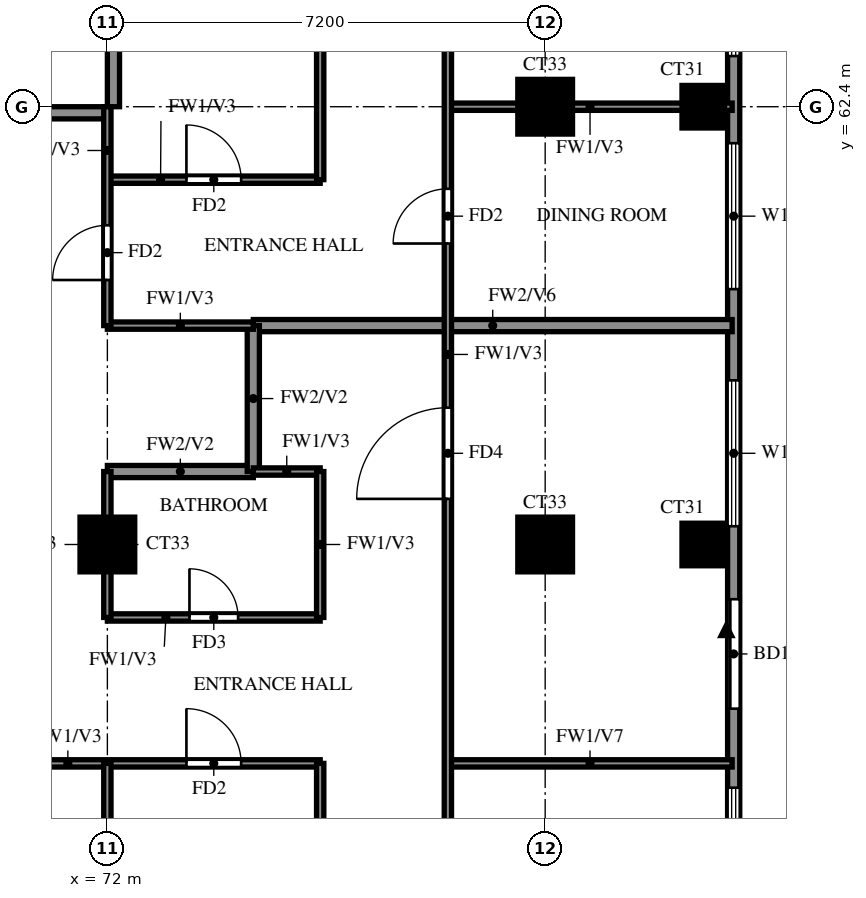
"""IFC4 building model, lengths in metres.
Left out: names, types, materials, properties, quantities, classifications, styles, units other than length and angle.
Written with IfcOpenShell. Run it as: python <this file> out.ifc"""

import sys

from ifc_helpers import new_model, si_unit, direction, frame, frame_2d, origin, origin_2d, place, context, subcontext, project, spatial, rectangle, extrude, source, transform, mapped, element, fill, save


model = new_model("IFC4")
c1 = context("Model", 3, precision=1e-05, world=origin(), true_north=direction((0.0, 1.0)))
c2 = subcontext(c1, "Body", "Model", "MODEL_VIEW")
j1 = project(units=[si_unit("LENGTHUNIT", "METRE"), si_unit("PLANEANGLEUNIT", "RADIAN")], contexts=[c1])
p1 = place(None, origin())
s1 = spatial("IfcSite", under=j1, at=p1, CompositionType="ELEMENT")
p2 = place(p1, origin())
s2 = spatial("IfcBuilding", under=s1, at=p2, CompositionType="ELEMENT")
p3 = place(p2, frame((0.0, 0.0, 211.5)))
s3 = spatial("IfcBuildingStorey", under=s2, at=p3, CompositionType="ELEMENT", Elevation=211.5)
m1 = source(origin(), c2, "Body", "SweptSolid", [
    extrude(rectangle(XDim=0.9, YDim=0.9, at=origin_2d()), origin(), (0.0, 0.0, 1.0), 3.22),
])
for number, where, z_axis, x_axis in (
    (1, (72.0, 55.2, 0.0), (0.0, 0.0, 1.0), (1.0, 0.0, 0.0)),
    (2, (79.2, 55.2, 0.0), (0.0, 0.0, 1.0), (1.0, 0.0, 0.0)),
):
    element("IfcColumn", number, at=place(p3, frame(where, z_axis=z_axis, x_axis=x_axis)), inside=s3, PredefinedType="COLUMN", context=c2, shape_type="MappedRepresentation", body=[
        mapped(m1, transform((0.0, 0.0, 0.0))),
    ])
m2 = source(origin(), c2, "Body", "SweptSolid", [
    extrude(rectangle(XDim=0.7, YDim=0.7, at=origin_2d()), origin(), (0.0, 0.0, 1.0), 3.5),
])
p4 = place(p3, frame((81.8, 55.2, -0.28), z_axis=(0.0, 0.0, 1.0), x_axis=(1.0, 0.0, 0.0)))
e3 = element("IfcColumn", 3, at=p4, inside=s3, PredefinedType="COLUMN", context=c2, shape_type="MappedRepresentation", body=[
    mapped(m2, transform((0.0, 0.0, 0.0))),
])
p5 = place(p3, frame((79.2, 62.4, 0.0), z_axis=(0.0, 0.0, 1.0), x_axis=(1.0, 0.0, 0.0)))
e4 = element("IfcColumn", 4, at=p5, inside=s3, PredefinedType="COLUMN", context=c2, shape_type="MappedRepresentation", body=[
    mapped(m1, transform((0.0, 0.0, 0.0))),
])
p6 = place(p3, frame((81.8, 62.4, -0.28), z_axis=(0.0, 0.0, 1.0), x_axis=(1.0, 0.0, 0.0)))
e5 = element("IfcColumn", 5, at=p6, inside=s3, PredefinedType="COLUMN", context=c2, shape_type="MappedRepresentation", body=[
    mapped(m2, transform((0.0, 0.0, 0.0))),
])
p7 = place(p3, frame((82.3, 48.2, 0.0), z_axis=(0.0, 0.0, 1.0), x_axis=(0.0, 1.0, 0.0)))
e6 = element("IfcWall", 6, at=p7, inside=s3, PredefinedType="SOLIDWALL", context=c2, shape_type="SweptSolid", body=[
    extrude(rectangle(XDim=28.6, YDim=0.2, at=frame_2d((14.3, 0.0))), origin(), (0.0, 0.0, 1.0), 3.22),
])
p8 = place(p7, frame((4.3, 0.0, 0.0)))
e7 = element("IfcOpeningElement", 7, at=p8, cuts=e6, PredefinedType="OPENING", context=c2, shape_type="SweptSolid", body=[
    extrude(rectangle(XDim=1.8, YDim=2.4, at=frame_2d((0.9, 1.2))), frame((0.0, 0.11, 0.0), z_axis=(0.0, -1.0, 0.0), x_axis=(1.0, 0.0, 0.0)), (0.0, 0.0, 1.0), 0.22),
])
p9 = place(p7, frame((0.6, 0.0, 0.6)))
e8 = element("IfcOpeningElement", 8, at=p9, cuts=e6, PredefinedType="OPENING", context=c2, shape_type="SweptSolid", body=[
    extrude(rectangle(XDim=2.4, YDim=2.4, at=frame_2d((1.2, 1.2))), frame((0.0, 0.11, 0.0), z_axis=(0.0, -1.0, 0.0), x_axis=(1.0, 0.0, 0.0)), (0.0, 0.0, 1.0), 0.22),
])
p10 = place(p7, frame((7.3, 0.0, 0.6)))
e9 = element("IfcOpeningElement", 9, at=p10, cuts=e6, PredefinedType="OPENING", context=c2, shape_type="SweptSolid", body=[
    extrude(rectangle(XDim=2.4, YDim=2.4, at=frame_2d((1.2, 1.2))), frame((0.0, 0.11, 0.0), z_axis=(0.0, -1.0, 0.0), x_axis=(1.0, 0.0, 0.0)), (0.0, 0.0, 1.0), 0.22),
])
p11 = place(p7, frame((11.2, 0.0, 0.6)))
e10 = element("IfcOpeningElement", 10, at=p11, cuts=e6, PredefinedType="OPENING", context=c2, shape_type="SweptSolid", body=[
    extrude(rectangle(XDim=2.4, YDim=2.4, at=frame_2d((1.2, 1.2))), frame((0.0, 0.11, 0.0), z_axis=(0.0, -1.0, 0.0), x_axis=(1.0, 0.0, 0.0)), (0.0, 0.0, 1.0), 0.22),
])
p12 = place(p7, frame((15.033, 0.0, 0.6)))
e11 = element("IfcOpeningElement", 11, at=p12, cuts=e6, PredefinedType="OPENING", context=c2, shape_type="SweptSolid", body=[
    extrude(rectangle(XDim=2.4, YDim=2.4, at=frame_2d((1.2, 1.2))), frame((0.0, 0.11, 0.0), z_axis=(0.0, -1.0, 0.0), x_axis=(1.0, 0.0, 0.0)), (0.0, 0.0, 1.0), 0.22),
])
p13 = place(p7, frame((18.167, 0.0, 0.6)))
e12 = element("IfcOpeningElement", 12, at=p13, cuts=e6, PredefinedType="OPENING", context=c2, shape_type="SweptSolid", body=[
    extrude(rectangle(XDim=2.4, YDim=2.4, at=frame_2d((1.2, 1.2))), frame((0.0, 0.11, 0.0), z_axis=(0.0, -1.0, 0.0), x_axis=(1.0, 0.0, 0.0)), (0.0, 0.0, 1.0), 0.22),
])
p14 = place(p7, frame((22.75, 0.0, 1.5)))
e13 = element("IfcOpeningElement", 13, at=p14, cuts=e6, PredefinedType="OPENING", context=c2, shape_type="SweptSolid", body=[
    extrude(rectangle(XDim=0.9, YDim=0.9, at=frame_2d((0.45, 0.45))), frame((0.0, 0.11, 0.0), z_axis=(0.0, -1.0, 0.0), x_axis=(1.0, 0.0, 0.0)), (0.0, 0.0, 1.0), 0.22),
])
p15 = place(p7, frame((25.5, 0.0, 0.6)))
e14 = element("IfcOpeningElement", 14, at=p15, cuts=e6, PredefinedType="OPENING", context=c2, shape_type="SweptSolid", body=[
    extrude(rectangle(XDim=2.4, YDim=2.4, at=frame_2d((1.2, 1.2))), frame((0.0, 0.11, 0.0), z_axis=(0.0, -1.0, 0.0), x_axis=(1.0, 0.0, 0.0)), (0.0, 0.0, 1.0), 0.22),
])
p16 = place(p3, frame((67.2, 62.3, 0.0), z_axis=(0.0, 0.0, 1.0), x_axis=(1.0, 0.0, 0.0)))
e15 = element("IfcWall", 15, at=p16, inside=s3, PredefinedType="SOLIDWALL", context=c2, shape_type="SweptSolid", body=[
    extrude(rectangle(XDim=4.8, YDim=0.2, at=frame_2d((2.4, 0.0))), origin(), (0.0, 0.0, 1.0), 3.22),
])
p17 = place(p3, frame((72.1, 62.4, 0.0), z_axis=(0.0, 0.0, 1.0), x_axis=(0.0, 1.0, 0.0)))
e16 = element("IfcWall", 16, at=p17, inside=s3, PredefinedType="SOLIDWALL", context=c2, shape_type="SweptSolid", body=[
    extrude(rectangle(XDim=15.6, YDim=0.2, at=frame_2d((7.8, 0.0))), origin(), (0.0, 0.0, 1.0), 3.22),
])
p18 = place(p3, frame((72.0, 56.4, 0.0), z_axis=(0.0, 0.0, 1.0), x_axis=(1.0, 0.0, 0.0)))
e17 = element("IfcWall", 17, at=p18, inside=s3, PredefinedType="SOLIDWALL", context=c2, shape_type="SweptSolid", body=[
    extrude(rectangle(XDim=2.4, YDim=0.2, at=frame_2d((1.2, 0.0))), origin(), (0.0, 0.0, 1.0), 3.22),
])
p19 = place(p3, frame((74.4, 58.8, 0.0), z_axis=(0.0, 0.0, 1.0), x_axis=(1.0, 0.0, 0.0)))
e18 = element("IfcWall", 18, at=p19, inside=s3, PredefinedType="SOLIDWALL", context=c2, shape_type="SweptSolid", body=[
    extrude(rectangle(XDim=7.875, YDim=0.2, at=frame_2d((3.938, 0.0))), origin(), (0.0, 0.0, 1.0), 2.32),
])
p20 = place(p3, frame((74.4, 56.4, 0.0), z_axis=(0.0, 0.0, 1.0), x_axis=(0.0, 1.0, 0.0)))
e19 = element("IfcWall", 19, at=p20, inside=s3, PredefinedType="SOLIDWALL", context=c2, shape_type="SweptSolid", body=[
    extrude(rectangle(XDim=2.4, YDim=0.2, at=frame_2d((1.2, 0.0))), origin(), (0.0, 0.0, 1.0), 3.22),
])
p21 = place(p3, frame((67.2, 51.6, 0.0), z_axis=(0.0, 0.0, 1.0), x_axis=(1.0, 0.0, 0.0)))
e20 = element("IfcWall", 20, at=p21, inside=s3, PredefinedType="PARTITIONING", context=c2, shape_type="SweptSolid", body=[
    extrude(rectangle(XDim=8.3, YDim=0.12, at=frame_2d((4.15, 0.0))), origin(), (0.0, 0.0, 1.0), 3.22),
])
p22 = place(p21, frame((6.1, 0.0, 0.0)))
e21 = element("IfcOpeningElement", 21, at=p22, cuts=e20, PredefinedType="OPENING", context=c2, shape_type="SweptSolid", body=[
    extrude(rectangle(XDim=0.9, YDim=2.1, at=frame_2d((0.45, 1.05))), frame((0.0, 0.07, 0.0), z_axis=(0.0, -1.0, 0.0), x_axis=(1.0, 0.0, 0.0)), (0.0, 0.0, 1.0), 0.14),
])
p23 = place(p21, frame((1.95, 0.0, 0.0)))
e22 = element("IfcOpeningElement", 22, at=p23, cuts=e20, PredefinedType="OPENING", context=c2, shape_type="SweptSolid", body=[
    extrude(rectangle(XDim=0.9, YDim=2.1, at=frame_2d((0.45, 1.05))), frame((0.0, 0.07, 0.0), z_axis=(0.0, -1.0, 0.0), x_axis=(1.0, 0.0, 0.0)), (0.0, 0.0, 1.0), 0.14),
])
p24 = place(p3, frame((77.6, 51.6, 0.0), z_axis=(0.0, 0.0, 1.0), x_axis=(1.0, 0.0, 0.0)))
e23 = element("IfcWall", 23, at=p24, inside=s3, PredefinedType="PARTITIONING", context=c2, shape_type="SweptSolid", body=[
    extrude(rectangle(XDim=4.675, YDim=0.12, at=frame_2d((2.337, 0.0))), origin(), (0.0, 0.0, 1.0), 2.32),
])
p25 = place(p3, frame((72.0, 54.0, 0.0), z_axis=(0.0, 0.0, 1.0), x_axis=(1.0, 0.0, 0.0)))
e24 = element("IfcWall", 24, at=p25, inside=s3, PredefinedType="PARTITIONING", context=c2, shape_type="SweptSolid", body=[
    extrude(rectangle(XDim=3.5, YDim=0.12, at=frame_2d((1.75, 0.0))), origin(), (0.0, 0.0, 1.0), 3.22),
])
p26 = place(p25, frame((1.35, 0.0, 0.0)))
e25 = element("IfcOpeningElement", 25, at=p26, cuts=e24, PredefinedType="OPENING", context=c2, shape_type="SweptSolid", body=[
    extrude(rectangle(XDim=0.8, YDim=2.1, at=frame_2d((0.4, 1.05))), frame((0.0, 0.07, 0.0), z_axis=(0.0, -1.0, 0.0), x_axis=(1.0, 0.0, 0.0)), (0.0, 0.0, 1.0), 0.14),
])
p27 = place(p3, frame((74.4, 56.4, 0.0), z_axis=(0.0, 0.0, 1.0), x_axis=(1.0, 0.0, 0.0)))
e26 = element("IfcWall", 26, at=p27, inside=s3, PredefinedType="PARTITIONING", context=c2, shape_type="SweptSolid", body=[
    extrude(rectangle(XDim=1.1, YDim=0.12, at=frame_2d((0.55, 0.0))), origin(), (0.0, 0.0, 1.0), 3.22),
])
p28 = place(p3, frame((72.0, 58.8, 0.0), z_axis=(0.0, 0.0, 1.0), x_axis=(1.0, 0.0, 0.0)))
e27 = element("IfcWall", 27, at=p28, inside=s3, PredefinedType="PARTITIONING", context=c2, shape_type="SweptSolid", body=[
    extrude(rectangle(XDim=2.4, YDim=0.12, at=frame_2d((1.2, 0.0))), origin(), (0.0, 0.0, 1.0), 3.22),
])
p29 = place(p3, frame((72.0, 61.2, 0.0), z_axis=(0.0, 0.0, 1.0), x_axis=(1.0, 0.0, 0.0)))
e28 = element("IfcWall", 28, at=p29, inside=s3, PredefinedType="PARTITIONING", context=c2, shape_type="SweptSolid", body=[
    extrude(rectangle(XDim=3.5, YDim=0.12, at=frame_2d((1.75, 0.0))), origin(), (0.0, 0.0, 1.0), 3.22),
])
p30 = place(p29, frame((1.3, 0.0, 0.0)))
e29 = element("IfcOpeningElement", 29, at=p30, cuts=e28, PredefinedType="OPENING", context=c2, shape_type="SweptSolid", body=[
    extrude(rectangle(XDim=0.9, YDim=2.1, at=frame_2d((0.45, 1.05))), frame((0.0, 0.07, 0.0), z_axis=(0.0, -1.0, 0.0), x_axis=(1.0, 0.0, 0.0)), (0.0, 0.0, 1.0), 0.14),
])
p31 = place(p3, frame((77.6, 62.4, 0.0), z_axis=(0.0, 0.0, 1.0), x_axis=(1.0, 0.0, 0.0)))
e30 = element("IfcWall", 30, at=p31, inside=s3, PredefinedType="PARTITIONING", context=c2, shape_type="SweptSolid", body=[
    extrude(rectangle(XDim=4.675, YDim=0.12, at=frame_2d((2.337, 0.0))), origin(), (0.0, 0.0, 1.0), 3.22),
])
p32 = place(p3, frame((72.0, 48.125, 0.0), z_axis=(0.0, 0.0, 1.0), x_axis=(0.0, 1.0, 0.0)))
e31 = element("IfcWall", 31, at=p32, inside=s3, PredefinedType="PARTITIONING", context=c2, shape_type="SweptSolid", body=[
    extrude(rectangle(XDim=3.475, YDim=0.12, at=frame_2d((1.738, 0.0))), origin(), (0.0, 0.0, 1.0), 3.22),
])
p33 = place(p3, frame((72.0, 54.0, 0.0), z_axis=(0.0, 0.0, 1.0), x_axis=(0.0, 1.0, 0.0)))
e32 = element("IfcWall", 32, at=p33, inside=s3, PredefinedType="PARTITIONING", context=c2, shape_type="SweptSolid", body=[
    extrude(rectangle(XDim=2.4, YDim=0.12, at=frame_2d((1.2, 0.0))), origin(), (0.0, 0.0, 1.0), 3.22),
])
p34 = place(p3, frame((72.0, 58.8, 0.0), z_axis=(0.0, 0.0, 1.0), x_axis=(0.0, 1.0, 0.0)))
e33 = element("IfcWall", 33, at=p34, inside=s3, PredefinedType="PARTITIONING", context=c2, shape_type="SweptSolid", body=[
    extrude(rectangle(XDim=3.6, YDim=0.12, at=frame_2d((1.8, 0.0))), origin(), (0.0, 0.0, 1.0), 3.22),
])
p35 = place(p34, frame((0.75, 0.0, 0.0)))
e34 = element("IfcOpeningElement", 34, at=p35, cuts=e33, PredefinedType="OPENING", context=c2, shape_type="SweptSolid", body=[
    extrude(rectangle(XDim=0.9, YDim=2.1, at=frame_2d((0.45, 1.05))), frame((0.0, 0.07, 0.0), z_axis=(0.0, -1.0, 0.0), x_axis=(1.0, 0.0, 0.0)), (0.0, 0.0, 1.0), 0.14),
])
p36 = place(p3, frame((75.5, 48.125, 0.0), z_axis=(0.0, 0.0, 1.0), x_axis=(0.0, 1.0, 0.0)))
e35 = element("IfcWall", 35, at=p36, inside=s3, PredefinedType="PARTITIONING", context=c2, shape_type="SweptSolid", body=[
    extrude(rectangle(XDim=3.475, YDim=0.12, at=frame_2d((1.738, 0.0))), origin(), (0.0, 0.0, 1.0), 3.22),
])
p37 = place(p3, frame((75.5, 54.0, 0.0), z_axis=(0.0, 0.0, 1.0), x_axis=(0.0, 1.0, 0.0)))
e36 = element("IfcWall", 36, at=p37, inside=s3, PredefinedType="PARTITIONING", context=c2, shape_type="SweptSolid", body=[
    extrude(rectangle(XDim=2.4, YDim=0.12, at=frame_2d((1.2, 0.0))), origin(), (0.0, 0.0, 1.0), 3.22),
])
p38 = place(p3, frame((75.5, 61.2, 0.0), z_axis=(0.0, 0.0, 1.0), x_axis=(0.0, 1.0, 0.0)))
e37 = element("IfcWall", 37, at=p38, inside=s3, PredefinedType="PARTITIONING", context=c2, shape_type="SweptSolid", body=[
    extrude(rectangle(XDim=12.0, YDim=0.12, at=frame_2d((6.0, 0.0))), origin(), (0.0, 0.0, 1.0), 3.22),
])
p39 = place(p38, frame((4.2, 0.0, 0.0)))
e38 = element("IfcOpeningElement", 38, at=p39, cuts=e37, PredefinedType="OPENING", context=c2, shape_type="SweptSolid", body=[
    extrude(rectangle(XDim=0.9, YDim=2.1, at=frame_2d((0.45, 1.05))), frame((0.0, 0.07, 0.0), z_axis=(0.0, -1.0, 0.0), x_axis=(1.0, 0.0, 0.0)), (0.0, 0.0, 1.0), 0.14),
])
p40 = place(p38, frame((7.975, 0.0, 0.0)))
e39 = element("IfcOpeningElement", 39, at=p40, cuts=e37, PredefinedType="OPENING", context=c2, shape_type="SweptSolid", body=[
    extrude(rectangle(XDim=0.8, YDim=2.1, at=frame_2d((0.4, 1.05))), frame((0.0, 0.07, 0.0), z_axis=(0.0, -1.0, 0.0), x_axis=(1.0, 0.0, 0.0)), (0.0, 0.0, 1.0), 0.14),
])
p41 = place(p38, frame((10.45, 0.0, 0.0)))
e40 = element("IfcOpeningElement", 40, at=p41, cuts=e37, PredefinedType="OPENING", context=c2, shape_type="SweptSolid", body=[
    extrude(rectangle(XDim=0.8, YDim=2.1, at=frame_2d((0.4, 1.05))), frame((0.0, 0.07, 0.0), z_axis=(0.0, -1.0, 0.0), x_axis=(1.0, 0.0, 0.0)), (0.0, 0.0, 1.0), 0.14),
])
p42 = place(p3, frame((77.6, 48.125, 0.0), z_axis=(0.0, 0.0, 1.0), x_axis=(0.0, 1.0, 0.0)))
e41 = element("IfcWall", 41, at=p42, inside=s3, PredefinedType="PARTITIONING", context=c2, shape_type="SweptSolid", body=[
    extrude(rectangle(XDim=21.475, YDim=0.12, at=frame_2d((10.738, 0.0))), origin(), (0.0, 0.0, 1.0), 3.22),
])
p43 = place(p42, frame((1.288, 0.0, 0.0)))
e42 = element("IfcOpeningElement", 42, at=p43, cuts=e41, PredefinedType="OPENING", context=c2, shape_type="SweptSolid", body=[
    extrude(rectangle(XDim=0.9, YDim=2.1, at=frame_2d((0.45, 1.05))), frame((0.0, 0.07, 0.0), z_axis=(0.0, -1.0, 0.0), x_axis=(1.0, 0.0, 0.0)), (0.0, 0.0, 1.0), 0.14),
])
p44 = place(p42, frame((7.825, 0.0, 0.0)))
e43 = element("IfcOpeningElement", 43, at=p44, cuts=e41, PredefinedType="OPENING", context=c2, shape_type="SweptSolid", body=[
    extrude(rectangle(XDim=1.5, YDim=2.1, at=frame_2d((0.75, 1.05))), frame((0.0, 0.07, 0.0), z_axis=(0.0, -1.0, 0.0), x_axis=(1.0, 0.0, 0.0)), (0.0, 0.0, 1.0), 0.14),
])
p45 = place(p42, frame((12.025, 0.0, 0.0)))
e44 = element("IfcOpeningElement", 44, at=p45, cuts=e41, PredefinedType="OPENING", context=c2, shape_type="SweptSolid", body=[
    extrude(rectangle(XDim=0.9, YDim=2.1, at=frame_2d((0.45, 1.05))), frame((0.0, 0.07, 0.0), z_axis=(0.0, -1.0, 0.0), x_axis=(1.0, 0.0, 0.0)), (0.0, 0.0, 1.0), 0.14),
])
p46 = place(p42, frame((17.425, 0.0, 0.0)))
e45 = element("IfcOpeningElement", 45, at=p46, cuts=e41, PredefinedType="OPENING", context=c2, shape_type="SweptSolid", body=[
    extrude(rectangle(XDim=0.9, YDim=2.1, at=frame_2d((0.45, 1.05))), frame((0.0, 0.07, 0.0), z_axis=(0.0, -1.0, 0.0), x_axis=(1.0, 0.0, 0.0)), (0.0, 0.0, 1.0), 0.14),
])
p47 = place(p8, origin())
e46 = element("IfcDoor", 46, at=p47, inside=s3, OperationType="DOUBLE_DOOR_SLIDING", PredefinedType="DOOR", context=c2, shape_type="SweptSolid", body=[
    extrude(rectangle(XDim=1.8, YDim=2.4, at=frame_2d((0.9, 1.2))), frame((0.0, 0.025, 0.0), z_axis=(0.0, -1.0, 0.0), x_axis=(1.0, 0.0, 0.0)), (0.0, 0.0, 1.0), 0.05),
])
fill(e7, e46)
p48 = place(p9, origin())
e47 = element("IfcWindow", 47, at=p48, inside=s3, PartitioningType="DOUBLE_PANEL_VERTICAL", PredefinedType="WINDOW", context=c2, shape_type="SweptSolid", body=[
    extrude(rectangle(XDim=2.4, YDim=2.4, at=frame_2d((1.2, 1.2))), frame((0.0, 0.03, 0.0), z_axis=(0.0, -1.0, 0.0), x_axis=(1.0, 0.0, 0.0)), (0.0, 0.0, 1.0), 0.06),
])
fill(e8, e47)
p49 = place(p10, origin())
e48 = element("IfcWindow", 48, at=p49, inside=s3, PartitioningType="DOUBLE_PANEL_VERTICAL", PredefinedType="WINDOW", context=c2, shape_type="SweptSolid", body=[
    extrude(rectangle(XDim=2.4, YDim=2.4, at=frame_2d((1.2, 1.2))), frame((0.0, 0.03, 0.0), z_axis=(0.0, -1.0, 0.0), x_axis=(1.0, 0.0, 0.0)), (0.0, 0.0, 1.0), 0.06),
])
fill(e9, e48)
p50 = place(p11, origin())
e49 = element("IfcWindow", 49, at=p50, inside=s3, PartitioningType="DOUBLE_PANEL_VERTICAL", PredefinedType="WINDOW", context=c2, shape_type="SweptSolid", body=[
    extrude(rectangle(XDim=2.4, YDim=2.4, at=frame_2d((1.2, 1.2))), frame((0.0, 0.03, 0.0), z_axis=(0.0, -1.0, 0.0), x_axis=(1.0, 0.0, 0.0)), (0.0, 0.0, 1.0), 0.06),
])
fill(e10, e49)
p51 = place(p12, origin())
e50 = element("IfcWindow", 50, at=p51, inside=s3, PartitioningType="DOUBLE_PANEL_VERTICAL", PredefinedType="WINDOW", context=c2, shape_type="SweptSolid", body=[
    extrude(rectangle(XDim=2.4, YDim=2.4, at=frame_2d((1.2, 1.2))), frame((0.0, 0.03, 0.0), z_axis=(0.0, -1.0, 0.0), x_axis=(1.0, 0.0, 0.0)), (0.0, 0.0, 1.0), 0.06),
])
fill(e11, e50)
p52 = place(p44, origin())
e51 = element("IfcDoor", 51, at=p52, inside=s3, OperationType="SINGLE_SWING_RIGHT", PredefinedType="DOOR", context=c2, shape_type="SweptSolid", body=[
    extrude(rectangle(XDim=1.5, YDim=2.1, at=frame_2d((0.75, 1.05))), frame((0.0, 0.025, 0.0), z_axis=(0.0, -1.0, 0.0), x_axis=(1.0, 0.0, 0.0)), (0.0, 0.0, 1.0), 0.05),
])
fill(e43, e51)
p53 = place(p22, origin())
e52 = element("IfcDoor", 52, at=p53, inside=s3, OperationType="SINGLE_SWING_RIGHT", PredefinedType="DOOR", context=c2, shape_type="SweptSolid", body=[
    extrude(rectangle(XDim=0.9, YDim=2.1, at=frame_2d((0.45, 1.05))), frame((0.0, 0.025, 0.0), z_axis=(0.0, -1.0, 0.0), x_axis=(1.0, 0.0, 0.0)), (0.0, 0.0, 1.0), 0.05),
])
fill(e21, e52)
p54 = place(p26, origin())
e53 = element("IfcDoor", 53, at=p54, inside=s3, OperationType="SINGLE_SWING_LEFT", PredefinedType="DOOR", context=c2, shape_type="SweptSolid", body=[
    extrude(rectangle(XDim=0.8, YDim=2.1, at=frame_2d((0.4, 1.05))), frame((0.0, 0.025, 0.0), z_axis=(0.0, -1.0, 0.0), x_axis=(1.0, 0.0, 0.0)), (0.0, 0.0, 1.0), 0.05),
])
fill(e25, e53)
p55 = place(p35, origin())
e54 = element("IfcDoor", 54, at=p55, inside=s3, OperationType="SINGLE_SWING_LEFT", PredefinedType="DOOR", context=c2, shape_type="SweptSolid", body=[
    extrude(rectangle(XDim=0.9, YDim=2.1, at=frame_2d((0.45, 1.05))), frame((0.0, 0.025, 0.0), z_axis=(0.0, -1.0, 0.0), x_axis=(1.0, 0.0, 0.0)), (0.0, 0.0, 1.0), 0.05),
])
fill(e34, e54)
p56 = place(p45, origin())
e55 = element("IfcDoor", 55, at=p56, inside=s3, OperationType="SINGLE_SWING_RIGHT", PredefinedType="DOOR", context=c2, shape_type="SweptSolid", body=[
    extrude(rectangle(XDim=0.9, YDim=2.1, at=frame_2d((0.45, 1.05))), frame((0.0, 0.025, 0.0), z_axis=(0.0, -1.0, 0.0), x_axis=(1.0, 0.0, 0.0)), (0.0, 0.0, 1.0), 0.05),
])
fill(e44, e55)
p57 = place(p30, origin())
e56 = element("IfcDoor", 56, at=p57, inside=s3, OperationType="SINGLE_SWING_LEFT", PredefinedType="DOOR", context=c2, shape_type="SweptSolid", body=[
    extrude(rectangle(XDim=0.9, YDim=2.1, at=frame_2d((0.45, 1.05))), frame((0.0, 0.025, 0.0), z_axis=(0.0, -1.0, 0.0), x_axis=(1.0, 0.0, 0.0)), (0.0, 0.0, 1.0), 0.05),
])
fill(e29, e56)
save(model, sys.argv[1])
